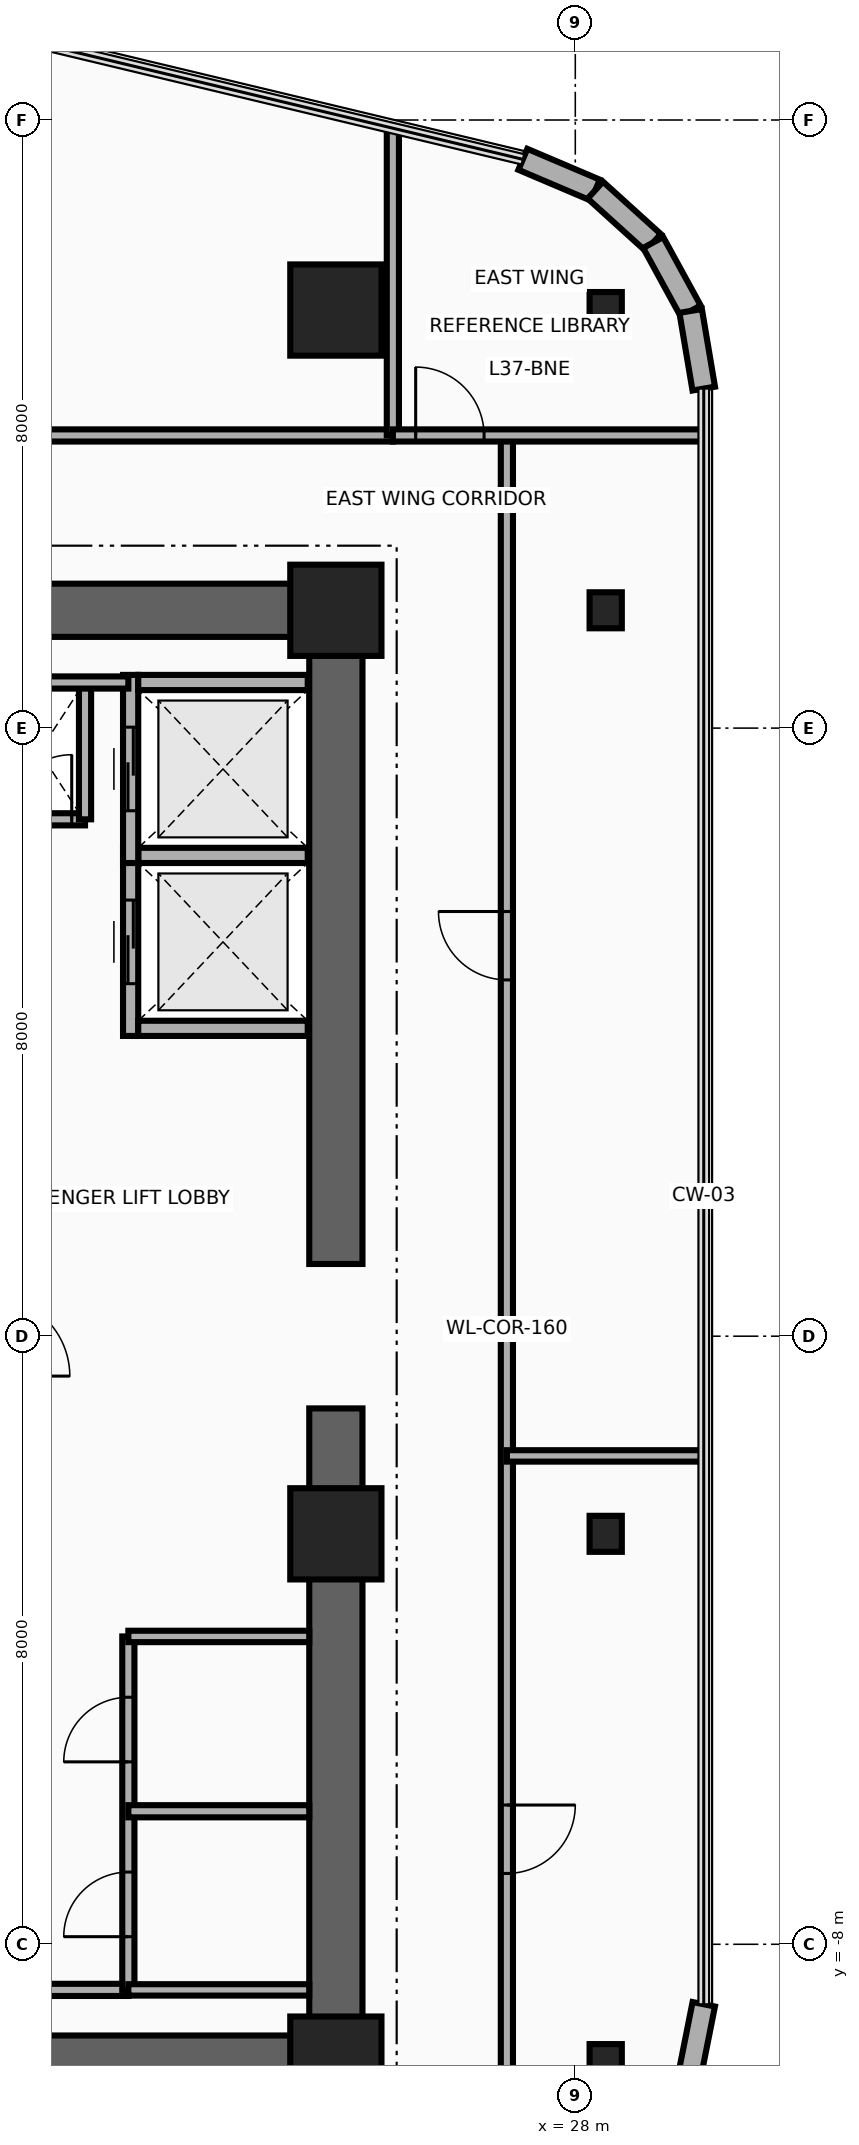
"""IFC4 building model, lengths in metres.
Left out: names, types, materials, properties, quantities, classifications, styles, units other than length and angle.
Written with IfcOpenShell. Run it as: python <this file> out.ifc"""

import sys

from ifc_helpers import new_model, si_unit, direction, frame, frame_2d, origin, origin_2d, place, context, subcontext, project, spatial, rectangle, i_section, extrude, source, transform, mapped, element, fill, save


model = new_model("IFC4")
c1 = context("Model", 3, precision=1e-05, world=origin(), true_north=direction((0.0, 1.0)))
c2 = subcontext(c1, "Body", "Model", "MODEL_VIEW")
j1 = project(units=[si_unit("LENGTHUNIT", "METRE"), si_unit("PLANEANGLEUNIT", "RADIAN")], contexts=[c1])
p1 = place(None, origin())
s1 = spatial("IfcSite", under=j1, at=p1, CompositionType="ELEMENT")
p2 = place(p1, origin())
s2 = spatial("IfcBuilding", under=s1, at=p2, CompositionType="ELEMENT")
p3 = place(p2, frame((0.0, 0.0, 146.4)))
s3 = spatial("IfcBuildingStorey", under=s2, at=p3, CompositionType="ELEMENT", Elevation=146.4)
for number, where, z_axis, x_axis in (
    (1, (24.85, -9.9, 0.0), (0.0, 0.0, 1.0), (0.0, 1.0, 0.0)),
    (2, (24.85, 0.95, 0.0), (0.0, 0.0, 1.0), (0.0, 1.0, 0.0)),
):
    element("IfcWall", number, at=place(p3, frame(where, z_axis=z_axis, x_axis=x_axis)), inside=s3, PredefinedType="SHEAR", context=c2, shape_type="SweptSolid", body=[
        extrude(rectangle(XDim=8.95, YDim=0.7, at=frame_2d((4.475, 0.0))), origin(), (0.0, 0.0, 1.0), 3.46),
    ])
for number, where, z_axis, x_axis in (
    (3, (15.85, 9.55, 0.0), (0.0, 0.0, 1.0), (1.0, 0.0, 0.0)),
    (4, (15.85, -9.55, 0.0), (0.0, 0.0, 1.0), (1.0, 0.0, 0.0)),
):
    element("IfcWall", number, at=place(p3, frame(where, z_axis=z_axis, x_axis=x_axis)), inside=s3, PredefinedType="SHEAR", context=c2, shape_type="SweptSolid", body=[
        extrude(rectangle(XDim=9.0, YDim=0.7, at=frame_2d((4.5, 0.0))), origin(), (0.0, 0.0, 1.0), 3.46),
    ])
m1 = source(origin(), c2, "Body", "SweptSolid", [
    extrude(rectangle(XDim=1.2, YDim=1.2, at=origin_2d()), origin(), (0.0, 0.0, 1.0), 3.7),
])
p4 = place(p3, frame((24.85, -9.55, 0.0), z_axis=(0.0, 0.0, 1.0), x_axis=(1.0, 0.0, 0.0)))
e5 = element("IfcColumn", 5, at=p4, inside=s3, PredefinedType="COLUMN", context=c2, shape_type="MappedRepresentation", body=[
    mapped(m1, transform((0.0, 0.0, 0.0), x_axis=(1.0, 0.0, 0.0), y_axis=(0.0, 1.0, 0.0), z_axis=(0.0, 0.0, 1.0), scale=1.0)),
])
m2 = source(origin(), c2, "Body", "SweptSolid", [
    extrude(i_section(OverallWidth=0.424, OverallDepth=0.474, WebThickness=0.048, FlangeThickness=0.077, at=origin_2d()), origin(), (0.0, 0.0, 1.0), 3.7),
])
p5 = place(p3, frame((28.4, -9.55, 0.0), z_axis=(0.0, 0.0, 1.0), x_axis=(1.0, 0.0, 0.0)))
e6 = element("IfcColumn", 6, at=p5, inside=s3, PredefinedType="COLUMN", context=c2, shape_type="MappedRepresentation", body=[
    mapped(m2, transform((0.0, 0.0, 0.0), x_axis=(1.0, 0.0, 0.0), y_axis=(0.0, 1.0, 0.0), z_axis=(0.0, 0.0, 1.0), scale=1.0)),
])
p6 = place(p3, frame((24.85, -2.6, 0.0), z_axis=(0.0, 0.0, 1.0), x_axis=(1.0, 0.0, 0.0)))
e7 = element("IfcColumn", 7, at=p6, inside=s3, PredefinedType="COLUMN", context=c2, shape_type="MappedRepresentation", body=[
    mapped(m1, transform((0.0, 0.0, 0.0), x_axis=(1.0, 0.0, 0.0), y_axis=(0.0, 1.0, 0.0), z_axis=(0.0, 0.0, 1.0), scale=1.0)),
])
p7 = place(p3, frame((28.4, -2.6, 0.0), z_axis=(0.0, 0.0, 1.0), x_axis=(1.0, 0.0, 0.0)))
e8 = element("IfcColumn", 8, at=p7, inside=s3, PredefinedType="COLUMN", context=c2, shape_type="MappedRepresentation", body=[
    mapped(m2, transform((0.0, 0.0, 0.0), x_axis=(1.0, 0.0, 0.0), y_axis=(0.0, 1.0, 0.0), z_axis=(0.0, 0.0, 1.0), scale=1.0)),
])
p8 = place(p3, frame((24.85, 9.55, 0.0), z_axis=(0.0, 0.0, 1.0), x_axis=(1.0, 0.0, 0.0)))
e9 = element("IfcColumn", 9, at=p8, inside=s3, PredefinedType="COLUMN", context=c2, shape_type="MappedRepresentation", body=[
    mapped(m1, transform((0.0, 0.0, 0.0), x_axis=(1.0, 0.0, 0.0), y_axis=(0.0, 1.0, 0.0), z_axis=(0.0, 0.0, 1.0), scale=1.0)),
])
p9 = place(p3, frame((28.4, 9.55, 0.0), z_axis=(0.0, 0.0, 1.0), x_axis=(1.0, 0.0, 0.0)))
e10 = element("IfcColumn", 10, at=p9, inside=s3, PredefinedType="COLUMN", context=c2, shape_type="MappedRepresentation", body=[
    mapped(m2, transform((0.0, 0.0, 0.0), x_axis=(1.0, 0.0, 0.0), y_axis=(0.0, 1.0, 0.0), z_axis=(0.0, 0.0, 1.0), scale=1.0)),
])
p10 = place(p3, frame((24.85, 13.5, 0.0), z_axis=(0.0, 0.0, 1.0), x_axis=(1.0, 0.0, 0.0)))
e11 = element("IfcColumn", 11, at=p10, inside=s3, PredefinedType="COLUMN", context=c2, shape_type="MappedRepresentation", body=[
    mapped(m1, transform((0.0, 0.0, 0.0), x_axis=(1.0, 0.0, 0.0), y_axis=(0.0, 1.0, 0.0), z_axis=(0.0, 0.0, 1.0), scale=1.0)),
])
p11 = place(p3, frame((28.4, 13.5, 0.0), z_axis=(0.0, 0.0, 1.0), x_axis=(1.0, 0.0, 0.0)))
e12 = element("IfcColumn", 12, at=p11, inside=s3, PredefinedType="COLUMN", context=c2, shape_type="MappedRepresentation", body=[
    mapped(m2, transform((0.0, 0.0, 0.0), x_axis=(1.0, 0.0, 0.0), y_axis=(0.0, 1.0, 0.0), z_axis=(0.0, 0.0, 1.0), scale=1.0)),
])
p12 = place(p3, frame((27.31, 15.483, 0.0), z_axis=(0.0, 0.0, 1.0), x_axis=(0.920250328759, -0.391330208927, 0.0)))
e13 = element("IfcWall", 13, at=p12, inside=s3, PredefinedType="SOLIDWALL", context=c2, shape_type="SweptSolid", body=[
    extrude(rectangle(XDim=1.036, YDim=0.3, at=frame_2d((0.518, 0.0))), origin(), (0.0, 0.0, 1.0), 3.46),
])
p13 = place(p3, frame((28.264, 15.077, 0.0), z_axis=(0.0, 0.0, 1.0), x_axis=(0.741208839713, -0.671274501178, 0.0)))
e14 = element("IfcWall", 14, at=p13, inside=s3, PredefinedType="SOLIDWALL", context=c2, shape_type="SweptSolid", body=[
    extrude(rectangle(XDim=1.026, YDim=0.3, at=frame_2d((0.513, 0.0))), origin(), (0.0, 0.0, 1.0), 3.46),
])
p14 = place(p3, frame((29.025, 14.388, 0.0), z_axis=(0.0, 0.0, 1.0), x_axis=(0.480284137298, -0.87711296163, 0.0)))
e15 = element("IfcWall", 15, at=p14, inside=s3, PredefinedType="SOLIDWALL", context=c2, shape_type="SweptSolid", body=[
    extrude(rectangle(XDim=1.027, YDim=0.3, at=frame_2d((0.513, 0.0))), origin(), (0.0, 0.0, 1.0), 3.46),
])
p15 = place(p3, frame((29.518, 13.488, 0.0), z_axis=(0.0, 0.0, 1.0), x_axis=(0.166156796952, -0.986099345313, 0.0)))
e16 = element("IfcWall", 16, at=p15, inside=s3, PredefinedType="SOLIDWALL", context=c2, shape_type="SweptSolid", body=[
    extrude(rectangle(XDim=1.036, YDim=0.3, at=frame_2d((0.518, 0.0))), origin(), (0.0, 0.0, 1.0), 3.46),
])
p16 = place(p3, frame((29.69, -8.789, 0.0), z_axis=(0.0, 0.0, 1.0), x_axis=(-0.194996050505, -0.980804027463, 0.0)))
e17 = element("IfcWall", 17, at=p16, inside=s3, PredefinedType="SOLIDWALL", context=c2, shape_type="SweptSolid", body=[
    extrude(rectangle(XDim=1.216, YDim=0.3, at=frame_2d((0.608, 0.0))), origin(), (0.0, 0.0, 1.0), 3.46),
])
p17 = place(p3, frame((22.15, 3.95, 0.0), z_axis=(0.0, 0.0, 1.0), x_axis=(0.0, 1.0, 0.0)))
e18 = element("IfcWall", 18, at=p17, inside=s3, PredefinedType="MOVABLE", context=c2, shape_type="SweptSolid", body=[
    extrude(rectangle(XDim=2.475, YDim=0.2, at=frame_2d((1.238, 0.0))), origin(), (0.0, 0.0, 1.0), 3.46),
])
p18 = place(p17, frame((0.688, 0.0, 0.0)))
e19 = element("IfcOpeningElement", 19, at=p18, cuts=e18, PredefinedType="OPENING", context=c2, shape_type="SweptSolid", body=[
    extrude(rectangle(XDim=1.1, YDim=2.1, at=frame_2d((0.55, 1.05))), frame((0.0, 0.115, 0.0), z_axis=(0.0, -1.0, 0.0), x_axis=(1.0, 0.0, 0.0)), (0.0, 0.0, 1.0), 0.23),
])
for number, where, z_axis, x_axis in (
    (20, (22.25, 4.05, 0.0), (0.0, 0.0, 1.0), (1.0, 0.0, 0.0)),
    (21, (22.25, 6.325, 0.0), (0.0, 0.0, 1.0), (1.0, 0.0, 0.0)),
):
    element("IfcWall", number, at=place(p3, frame(where, z_axis=z_axis, x_axis=x_axis)), inside=s3, PredefinedType="MOVABLE", context=c2, shape_type="SweptSolid", body=[
        extrude(rectangle(XDim=2.23, YDim=0.2, at=frame_2d((1.115, 0.0))), origin(), (0.0, 0.0, 1.0), 2.245),
    ])
p19 = place(p3, frame((22.15, 6.225, 0.0), z_axis=(0.0, 0.0, 1.0), x_axis=(0.0, 1.0, 0.0)))
e22 = element("IfcWall", 22, at=p19, inside=s3, PredefinedType="MOVABLE", context=c2, shape_type="SweptSolid", body=[
    extrude(rectangle(XDim=2.475, YDim=0.2, at=frame_2d((1.237, 0.0))), origin(), (0.0, 0.0, 1.0), 3.46),
])
p20 = place(p19, frame((0.688, 0.0, 0.0)))
e23 = element("IfcOpeningElement", 23, at=p20, cuts=e22, PredefinedType="OPENING", context=c2, shape_type="SweptSolid", body=[
    extrude(rectangle(XDim=1.1, YDim=2.1, at=frame_2d((0.55, 1.05))), frame((0.0, 0.115, 0.0), z_axis=(0.0, -1.0, 0.0), x_axis=(1.0, 0.0, 0.0)), (0.0, 0.0, 1.0), 0.23),
])
p21 = place(p3, frame((22.25, 8.6, 0.0), z_axis=(0.0, 0.0, 1.0), x_axis=(1.0, 0.0, 0.0)))
e24 = element("IfcWall", 24, at=p21, inside=s3, PredefinedType="MOVABLE", context=c2, shape_type="SweptSolid", body=[
    extrude(rectangle(XDim=2.23, YDim=0.2, at=frame_2d((1.115, 0.0))), origin(), (0.0, 0.0, 1.0), 2.245),
])
p22 = place(p3, frame((20.35, 6.8, 0.0), z_axis=(0.0, 0.0, 1.0), x_axis=(1.0, 0.0, 0.0)))
e25 = element("IfcWall", 25, at=p22, inside=s3, PredefinedType="PARTITIONING", context=c2, shape_type="SweptSolid", body=[
    extrude(rectangle(XDim=1.2, YDim=0.16, at=frame_2d((0.6, 0.0))), origin(), (0.0, 0.0, 1.0), 3.46),
])
p23 = place(p22, frame((0.175, 0.0, 0.0)))
e26 = element("IfcOpeningElement", 26, at=p23, cuts=e25, PredefinedType="OPENING", context=c2, shape_type="SweptSolid", body=[
    extrude(rectangle(XDim=0.85, YDim=2.05, at=frame_2d((0.425, 1.025))), frame((0.0, 0.095, 0.0), z_axis=(0.0, -1.0, 0.0), x_axis=(1.0, 0.0, 0.0)), (0.0, 0.0, 1.0), 0.19),
])
p24 = place(p3, frame((21.55, 6.8, 0.0), z_axis=(0.0, 0.0, 1.0), x_axis=(0.0, 1.0, 0.0)))
e27 = element("IfcWall", 27, at=p24, inside=s3, PredefinedType="PARTITIONING", context=c2, shape_type="SweptSolid", body=[
    extrude(rectangle(XDim=1.8, YDim=0.16, at=frame_2d((0.9, 0.0))), origin(), (0.0, 0.0, 1.0), 3.46),
])
for number, where, z_axis, x_axis in (
    (28, (20.3, -8.6, 0.0), (0.0, 0.0, 1.0), (1.0, 0.0, 0.0)),
    (29, (20.3, 8.6, 0.0), (0.0, 0.0, 1.0), (1.0, 0.0, 0.0)),
):
    element("IfcWall", number, at=place(p3, frame(where, z_axis=z_axis, x_axis=x_axis)), inside=s3, PredefinedType="PARTITIONING", context=c2, shape_type="SweptSolid", body=[
        extrude(rectangle(XDim=1.82, YDim=0.16, at=frame_2d((0.91, 0.0))), origin(), (0.0, 0.0, 1.0), 3.46),
    ])
p25 = place(p3, frame((22.12, -8.6, 0.0), z_axis=(0.0, 0.0, 1.0), x_axis=(0.0, 1.0, 0.0)))
e30 = element("IfcWall", 30, at=p25, inside=s3, PredefinedType="PARTITIONING", context=c2, shape_type="SweptSolid", body=[
    extrude(rectangle(XDim=4.65, YDim=0.16, at=frame_2d((2.325, 0.0))), origin(), (0.0, 0.0, 1.0), 3.46),
])
p26 = place(p25, frame((0.7, 0.0, 0.0)))
e31 = element("IfcOpeningElement", 31, at=p26, cuts=e30, PredefinedType="OPENING", context=c2, shape_type="SweptSolid", body=[
    extrude(rectangle(XDim=0.85, YDim=2.05, at=frame_2d((0.425, 1.025))), frame((0.0, 0.095, 0.0), z_axis=(0.0, -1.0, 0.0), x_axis=(1.0, 0.0, 0.0)), (0.0, 0.0, 1.0), 0.19),
])
p27 = place(p25, frame((3.0, 0.0, 0.0)))
e32 = element("IfcOpeningElement", 32, at=p27, cuts=e30, PredefinedType="OPENING", context=c2, shape_type="SweptSolid", body=[
    extrude(rectangle(XDim=0.85, YDim=2.05, at=frame_2d((0.425, 1.025))), frame((0.0, 0.095, 0.0), z_axis=(0.0, -1.0, 0.0), x_axis=(1.0, 0.0, 0.0)), (0.0, 0.0, 1.0), 0.19),
])
for number, where, z_axis, x_axis in (
    (33, (22.12, -3.95, 0.0), (0.0, 0.0, 1.0), (1.0, 0.0, 0.0)),
    (34, (22.12, -8.6, 0.0), (0.0, 0.0, 1.0), (1.0, 0.0, 0.0)),
):
    element("IfcWall", number, at=place(p3, frame(where, z_axis=z_axis, x_axis=x_axis)), inside=s3, PredefinedType="PARTITIONING", context=c2, shape_type="SweptSolid", body=[
        extrude(rectangle(XDim=2.38, YDim=0.15, at=frame_2d((1.19, 0.0))), origin(), (0.0, 0.0, 1.0), 3.46),
    ])
p28 = place(p3, frame((22.12, -6.25, 0.0), z_axis=(0.0, 0.0, 1.0), x_axis=(1.0, 0.0, 0.0)))
e35 = element("IfcWall", 35, at=p28, inside=s3, PredefinedType="PARTITIONING", context=c2, shape_type="SweptSolid", body=[
    extrude(rectangle(XDim=2.38, YDim=0.16, at=frame_2d((1.19, 0.0))), origin(), (0.0, 0.0, 1.0), 3.46),
])
p29 = place(p3, frame((15.4, 11.85, 0.0), z_axis=(0.0, 0.0, 1.0), x_axis=(1.0, 0.0, 0.0)))
e36 = element("IfcWall", 36, at=p29, inside=s3, PredefinedType="PARTITIONING", context=c2, shape_type="SweptSolid", body=[
    extrude(rectangle(XDim=10.2, YDim=0.16, at=frame_2d((5.1, 0.0))), origin(), (0.0, 0.0, 1.0), 2.834),
])
p30 = place(p29, frame((4.65, 0.0, 0.0)))
e37 = element("IfcOpeningElement", 37, at=p30, cuts=e36, PredefinedType="OPENING", context=c2, shape_type="SweptSolid", body=[
    extrude(rectangle(XDim=0.9, YDim=2.1, at=frame_2d((0.45, 1.05))), frame((0.0, 0.095, 0.0), z_axis=(0.0, -1.0, 0.0), x_axis=(1.0, 0.0, 0.0)), (0.0, 0.0, 1.0), 0.19),
])
p31 = place(p3, frame((25.6, 11.85, 0.0), z_axis=(0.0, 0.0, 1.0), x_axis=(0.0, 1.0, 0.0)))
e38 = element("IfcWall", 38, at=p31, inside=s3, PredefinedType="PARTITIONING", context=c2, shape_type="SweptSolid", body=[
    extrude(rectangle(XDim=4.042, YDim=0.16, at=frame_2d((2.021, 0.0))), origin(), (0.0, 0.0, 1.0), 2.666),
])
p32 = place(p3, frame((27.1, -11.661, 0.0), z_axis=(0.0, 0.0, 1.0), x_axis=(0.0, 1.0, 0.0)))
e39 = element("IfcWall", 39, at=p32, inside=s3, PredefinedType="PARTITIONING", context=c2, shape_type="SweptSolid", body=[
    extrude(rectangle(XDim=23.511, YDim=0.16, at=frame_2d((11.755, 0.0))), origin(), (0.0, 0.0, 1.0), 2.666),
])
p33 = place(p32, frame((4.593, 0.0, 0.0)))
e40 = element("IfcOpeningElement", 40, at=p33, cuts=e39, PredefinedType="OPENING", context=c2, shape_type="SweptSolid", body=[
    extrude(rectangle(XDim=0.9, YDim=2.1, at=frame_2d((0.45, 1.05))), frame((0.0, 0.095, 0.0), z_axis=(0.0, -1.0, 0.0), x_axis=(1.0, 0.0, 0.0)), (0.0, 0.0, 1.0), 0.19),
])
p34 = place(p32, frame((16.348, 0.0, 0.0)))
e41 = element("IfcOpeningElement", 41, at=p34, cuts=e39, PredefinedType="OPENING", context=c2, shape_type="SweptSolid", body=[
    extrude(rectangle(XDim=0.9, YDim=2.1, at=frame_2d((0.45, 1.05))), frame((0.0, 0.095, 0.0), z_axis=(0.0, -1.0, 0.0), x_axis=(1.0, 0.0, 0.0)), (0.0, 0.0, 1.0), 0.19),
])
p35 = place(p3, frame((25.6, 11.85, 0.0), z_axis=(0.0, 0.0, 1.0), x_axis=(1.0, 0.0, 0.0)))
e42 = element("IfcWall", 42, at=p35, inside=s3, PredefinedType="PARTITIONING", context=c2, shape_type="SweptSolid", body=[
    extrude(rectangle(XDim=4.09, YDim=0.16, at=frame_2d((2.045, 0.0))), origin(), (0.0, 0.0, 1.0), 2.896),
])
p36 = place(p35, frame((0.3, 0.0, 0.0)))
e43 = element("IfcOpeningElement", 43, at=p36, cuts=e42, PredefinedType="OPENING", context=c2, shape_type="SweptSolid", body=[
    extrude(rectangle(XDim=0.9, YDim=2.1, at=frame_2d((0.45, 1.05))), frame((0.0, 0.095, 0.0), z_axis=(0.0, -1.0, 0.0), x_axis=(1.0, 0.0, 0.0)), (0.0, 0.0, 1.0), 0.19),
])
p37 = place(p3, frame((27.1, -1.575, 0.0), z_axis=(0.0, 0.0, 1.0), x_axis=(1.0, 0.0, 0.0)))
e44 = element("IfcWall", 44, at=p37, inside=s3, PredefinedType="PARTITIONING", context=c2, shape_type="SweptSolid", body=[
    extrude(rectangle(XDim=2.59, YDim=0.15, at=frame_2d((1.295, 0.0))), origin(), (0.0, 0.0, 1.0), 2.896),
])
p38 = place(p18, origin())
e45 = element("IfcDoor", 45, at=p38, inside=s3, OperationType="DOUBLE_DOOR_SLIDING", PredefinedType="DOOR", context=c2, shape_type="SweptSolid", body=[
    extrude(rectangle(XDim=1.1, YDim=2.1, at=frame_2d((0.55, 1.05))), frame((0.0, 0.025, 0.0), z_axis=(0.0, -1.0, 0.0), x_axis=(1.0, 0.0, 0.0)), (0.0, 0.0, 1.0), 0.05),
])
fill(e19, e45)
p39 = place(p20, origin())
e46 = element("IfcDoor", 46, at=p39, inside=s3, OperationType="DOUBLE_DOOR_SLIDING", PredefinedType="DOOR", context=c2, shape_type="SweptSolid", body=[
    extrude(rectangle(XDim=1.1, YDim=2.1, at=frame_2d((0.55, 1.05))), frame((0.0, 0.025, 0.0), z_axis=(0.0, -1.0, 0.0), x_axis=(1.0, 0.0, 0.0)), (0.0, 0.0, 1.0), 0.05),
])
fill(e23, e46)
p40 = place(p23, origin())
e47 = element("IfcDoor", 47, at=p40, inside=s3, OperationType="SINGLE_SWING_RIGHT", PredefinedType="DOOR", context=c2, shape_type="SweptSolid", body=[
    extrude(rectangle(XDim=0.85, YDim=2.05, at=frame_2d((0.425, 1.025))), frame((0.0, 0.025, 0.0), z_axis=(0.0, -1.0, 0.0), x_axis=(1.0, 0.0, 0.0)), (0.0, 0.0, 1.0), 0.05),
])
fill(e26, e47)
p41 = place(p26, origin())
e48 = element("IfcDoor", 48, at=p41, inside=s3, OperationType="SINGLE_SWING_LEFT", PredefinedType="DOOR", context=c2, shape_type="SweptSolid", body=[
    extrude(rectangle(XDim=0.85, YDim=2.05, at=frame_2d((0.425, 1.025))), frame((0.0, 0.025, 0.0), z_axis=(0.0, -1.0, 0.0), x_axis=(1.0, 0.0, 0.0)), (0.0, 0.0, 1.0), 0.05),
])
fill(e31, e48)
p42 = place(p27, origin())
e49 = element("IfcDoor", 49, at=p42, inside=s3, OperationType="SINGLE_SWING_RIGHT", PredefinedType="DOOR", context=c2, shape_type="SweptSolid", body=[
    extrude(rectangle(XDim=0.85, YDim=2.05, at=frame_2d((0.425, 1.025))), frame((0.0, 0.025, 0.0), z_axis=(0.0, -1.0, 0.0), x_axis=(1.0, 0.0, 0.0)), (0.0, 0.0, 1.0), 0.05),
])
fill(e32, e49)
p43 = place(p36, origin())
e50 = element("IfcDoor", 50, at=p43, inside=s3, OperationType="SINGLE_SWING_RIGHT", PredefinedType="DOOR", context=c2, shape_type="SweptSolid", body=[
    extrude(rectangle(XDim=0.9, YDim=2.1, at=frame_2d((0.45, 1.05))), frame((0.0, 0.025, 0.0), z_axis=(0.0, -1.0, 0.0), x_axis=(1.0, 0.0, 0.0)), (0.0, 0.0, 1.0), 0.05),
])
fill(e43, e50)
p44 = place(p33, frame((0.9, 0.0, 0.0), z_axis=(0.0, 0.0, 1.0), x_axis=(-1.0, 0.0, 0.0)))
e51 = element("IfcDoor", 51, at=p44, inside=s3, OperationType="SINGLE_SWING_LEFT", PredefinedType="DOOR", context=c2, shape_type="SweptSolid", body=[
    extrude(rectangle(XDim=0.9, YDim=2.1, at=frame_2d((0.45, 1.05))), frame((0.0, 0.025, 0.0), z_axis=(0.0, -1.0, 0.0), x_axis=(1.0, 0.0, 0.0)), (0.0, 0.0, 1.0), 0.05),
])
fill(e40, e51)
p45 = place(p34, origin())
e52 = element("IfcDoor", 52, at=p45, inside=s3, OperationType="SINGLE_SWING_RIGHT", PredefinedType="DOOR", context=c2, shape_type="SweptSolid", body=[
    extrude(rectangle(XDim=0.9, YDim=2.1, at=frame_2d((0.45, 1.05))), frame((0.0, 0.025, 0.0), z_axis=(0.0, -1.0, 0.0), x_axis=(1.0, 0.0, 0.0)), (0.0, 0.0, 1.0), 0.05),
])
fill(e41, e52)
save(model, sys.argv[1])
